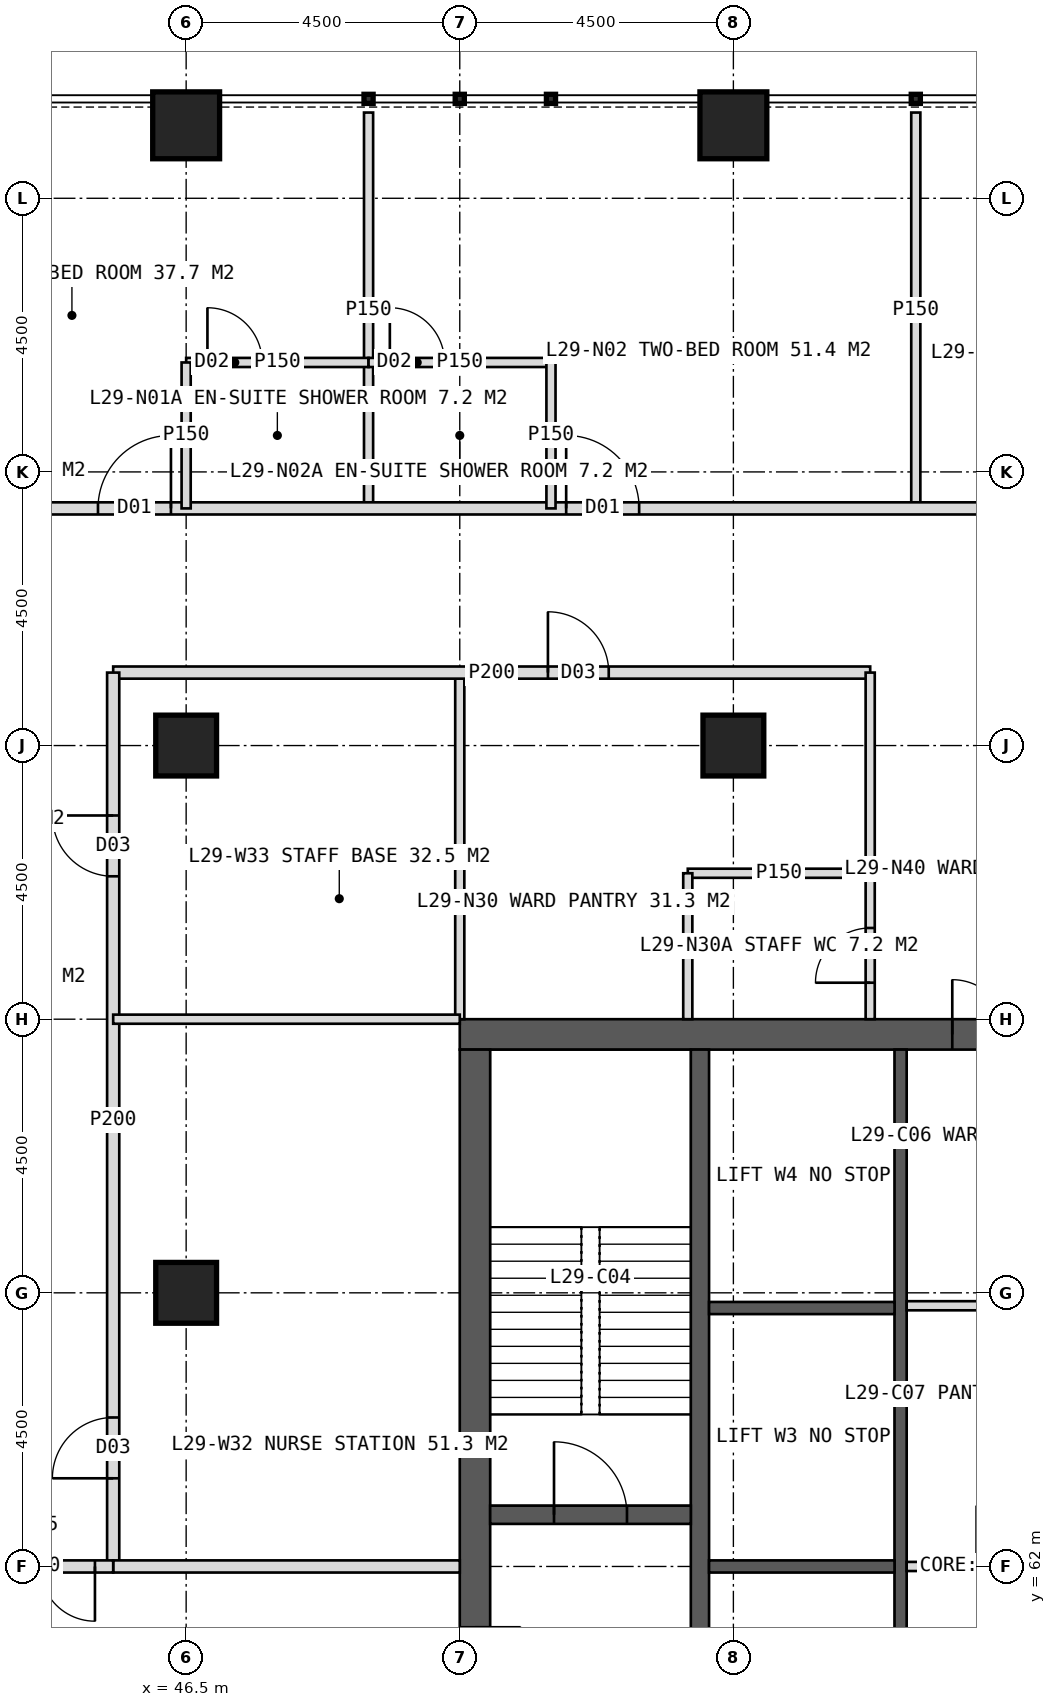
"""IFC4 building model, lengths in metres.
Left out: names, types, materials, properties, quantities, classifications, styles, units other than length and angle.
Written with IfcOpenShell. Run it as: python <this file> out.ifc"""

import sys

from ifc_helpers import new_model, si_unit, direction, frame, frame_2d, origin, origin_2d, place, context, subcontext, project, spatial, rectangle, hollow_rectangle, extrude, element, fill, save


model = new_model("IFC4")
c1 = context("Model", 3, precision=1e-05, world=origin(), true_north=direction((0.0, 1.0)))
c2 = subcontext(c1, "Body", "Model", "MODEL_VIEW")
j1 = project(units=[si_unit("LENGTHUNIT", "METRE"), si_unit("PLANEANGLEUNIT", "RADIAN")], contexts=[c1])
p1 = place(None, origin())
s1 = spatial("IfcSite", under=j1, at=p1, CompositionType="ELEMENT")
p2 = place(p1, origin())
s2 = spatial("IfcBuilding", under=s1, at=p2, CompositionType="ELEMENT")
p3 = place(p2, frame((0.0, 0.0, 124.0)))
s3 = spatial("IfcBuildingStorey", under=s2, at=p3, CompositionType="ELEMENT", Elevation=124.0)
p4 = place(p3, frame((51.0, 70.75, 0.0), z_axis=(0.0, 0.0, 1.0), x_axis=(1.0, 0.0, 0.0)))
e1 = element("IfcWall", 1, at=p4, inside=s3, PredefinedType="SHEAR", context=c2, shape_type="SweptSolid", body=[
    extrude(rectangle(XDim=18.0, YDim=0.5, at=frame_2d((9.0, 0.0))), origin(), (0.0, 0.0, 1.0), 4.0),
])
p5 = place(p4, frame((8.1, 0.0, 0.0)))
e2 = element("IfcOpeningElement", 2, at=p5, cuts=e1, PredefinedType="OPENING", context=c2, shape_type="SweptSolid", body=[
    extrude(rectangle(XDim=1.8, YDim=2.2, at=frame_2d((0.9, 1.1))), frame((0.0, 0.26, 0.0), z_axis=(0.0, -1.0, 0.0), x_axis=(1.0, 0.0, 0.0)), (0.0, 0.0, 1.0), 0.52),
])
p6 = place(p3, frame((51.25, 53.5, 0.0), z_axis=(0.0, 0.0, 1.0), x_axis=(0.0, 1.0, 0.0)))
e3 = element("IfcWall", 3, at=p6, inside=s3, PredefinedType="SHEAR", context=c2, shape_type="SweptSolid", body=[
    extrude(rectangle(XDim=17.0, YDim=0.5, at=frame_2d((8.5, 0.0))), origin(), (0.0, 0.0, 1.0), 4.0),
])
p7 = place(p6, frame((6.0, 0.0, 0.0)))
e4 = element("IfcOpeningElement", 4, at=p7, cuts=e3, PredefinedType="OPENING", context=c2, shape_type="SweptSolid", body=[
    extrude(rectangle(XDim=1.5, YDim=2.2, at=frame_2d((0.75, 1.1))), frame((0.0, 0.26, 0.0), z_axis=(0.0, -1.0, 0.0), x_axis=(1.0, 0.0, 0.0)), (0.0, 0.0, 1.0), 0.52),
])
p8 = place(p3, frame((54.95, 53.5, 0.0), z_axis=(0.0, 0.0, 1.0), x_axis=(0.0, 1.0, 0.0)))
e5 = element("IfcWall", 5, at=p8, inside=s3, PredefinedType="SHEAR", context=c2, shape_type="SweptSolid", body=[
    extrude(rectangle(XDim=17.0, YDim=0.3, at=frame_2d((8.5, 0.0))), origin(), (0.0, 0.0, 1.0), 4.0),
])
p9 = place(p3, frame((58.25, 53.5, 0.0), z_axis=(0.0, 0.0, 1.0), x_axis=(0.0, 1.0, 0.0)))
e6 = element("IfcWall", 6, at=p9, inside=s3, PredefinedType="SHEAR", context=c2, shape_type="SweptSolid", body=[
    extrude(rectangle(XDim=17.0, YDim=0.2, at=frame_2d((8.5, 0.0))), origin(), (0.0, 0.0, 1.0), 4.0),
])
p10 = place(p9, frame((1.375, 0.0, 0.0)))
e7 = element("IfcOpeningElement", 7, at=p10, cuts=e6, PredefinedType="OPENING", context=c2, shape_type="SweptSolid", body=[
    extrude(rectangle(XDim=1.4, YDim=2.2, at=frame_2d((0.7, 1.1))), frame((0.0, 0.11, 0.0), z_axis=(0.0, -1.0, 0.0), x_axis=(1.0, 0.0, 0.0)), (0.0, 0.0, 1.0), 0.22),
])
p11 = place(p9, frame((5.675, 0.0, 0.0)))
e8 = element("IfcOpeningElement", 8, at=p11, cuts=e6, PredefinedType="OPENING", context=c2, shape_type="SweptSolid", body=[
    extrude(rectangle(XDim=1.4, YDim=2.2, at=frame_2d((0.7, 1.1))), frame((0.0, 0.11, 0.0), z_axis=(0.0, -1.0, 0.0), x_axis=(1.0, 0.0, 0.0)), (0.0, 0.0, 1.0), 0.22),
])
for number, where, z_axis, x_axis in (
    (9, (55.1, 62.0, 0.0), (0.0, 0.0, 1.0), (1.0, 0.0, 0.0)),
    (10, (55.1, 66.25, 0.0), (0.0, 0.0, 1.0), (1.0, 0.0, 0.0)),
):
    element("IfcWall", number, at=place(p3, frame(where, z_axis=z_axis, x_axis=x_axis)), inside=s3, PredefinedType="SHEAR", context=c2, shape_type="SweptSolid", body=[
        extrude(rectangle(XDim=3.05, YDim=0.2, at=frame_2d((1.525, 0.0))), origin(), (0.0, 0.0, 1.0), 4.0),
    ])
p12 = place(p3, frame((51.5, 62.85, 0.0), z_axis=(0.0, 0.0, 1.0), x_axis=(1.0, 0.0, 0.0)))
e11 = element("IfcWall", 11, at=p12, inside=s3, PredefinedType="SHEAR", context=c2, shape_type="SweptSolid", body=[
    extrude(rectangle(XDim=3.3, YDim=0.3, at=frame_2d((1.65, 0.0))), origin(), (0.0, 0.0, 1.0), 4.0),
])
p13 = place(p12, frame((1.05, 0.0, 0.0)))
e12 = element("IfcOpeningElement", 12, at=p13, cuts=e11, PredefinedType="OPENING", context=c2, shape_type="SweptSolid", body=[
    extrude(rectangle(XDim=1.2, YDim=2.1, at=frame_2d((0.6, 1.05))), frame((0.0, 0.16, 0.0), z_axis=(0.0, -1.0, 0.0), x_axis=(1.0, 0.0, 0.0)), (0.0, 0.0, 1.0), 0.32),
])
for number, where, z_axis, x_axis in (
    (13, (46.5, 75.5, 0.0), (0.0, 0.0, 1.0), (1.0, 0.0, 0.0)),
    (14, (55.5, 75.5, 0.0), (0.0, 0.0, 1.0), (1.0, 0.0, 0.0)),
    (15, (46.5, 66.5, 0.0), (0.0, 0.0, 1.0), (1.0, 0.0, 0.0)),
):
    element("IfcColumn", number, at=place(p3, frame(where, z_axis=z_axis, x_axis=x_axis)), inside=s3, PredefinedType="COLUMN", context=c2, shape_type="SweptSolid", body=[
        extrude(hollow_rectangle(XDim=1.0, YDim=1.0, WallThickness=0.1, at=origin_2d()), origin(), (0.0, 0.0, 1.0), 4.0),
    ])
for number, where, z_axis, x_axis in (
    (16, (46.5, 85.7, 0.0), (0.0, 0.0, 1.0), (1.0, 0.0, 0.0)),
    (17, (55.5, 85.7, 0.0), (0.0, 0.0, 1.0), (1.0, 0.0, 0.0)),
):
    element("IfcColumn", number, at=place(p3, frame(where, z_axis=z_axis, x_axis=x_axis)), inside=s3, PredefinedType="COLUMN", context=c2, shape_type="SweptSolid", body=[
        extrude(hollow_rectangle(XDim=1.1, YDim=1.1, WallThickness=0.1, at=origin_2d()), origin(), (0.0, 0.0, 1.0), 4.0),
    ])
for number, where, z_axis, x_axis in (
    (18, (49.5, 79.4, 0.0), (0.0, 0.0, 1.0), (0.0, 1.0, 0.0)),
    (19, (58.5, 79.4, 0.0), (0.0, 0.0, 1.0), (0.0, 1.0, 0.0)),
):
    element("IfcWall", number, at=place(p3, frame(where, z_axis=z_axis, x_axis=x_axis)), inside=s3, PredefinedType="PARTITIONING", context=c2, shape_type="SweptSolid", body=[
        extrude(rectangle(XDim=6.51, YDim=0.15, at=frame_2d((3.255, 0.0))), origin(), (0.0, 0.0, 1.0), 3.75),
    ])
p14 = place(p3, frame((42.6, 79.4, 0.0), z_axis=(0.0, 0.0, 1.0), x_axis=(1.0, 0.0, 0.0)))
e20 = element("IfcWall", 20, at=p14, inside=s3, PredefinedType="PARTITIONING", context=c2, shape_type="SweptSolid", body=[
    extrude(rectangle(XDim=34.8, YDim=0.2, at=frame_2d((17.4, 0.0))), origin(), (0.0, 0.0, 1.0), 3.75),
])
p15 = place(p14, frame((2.45, 0.0, 0.0)))
e21 = element("IfcOpeningElement", 21, at=p15, cuts=e20, PredefinedType="OPENING", context=c2, shape_type="SweptSolid", body=[
    extrude(rectangle(XDim=1.2, YDim=2.2, at=frame_2d((0.6, 1.1))), frame((0.0, 0.11, 0.0), z_axis=(0.0, -1.0, 0.0), x_axis=(1.0, 0.0, 0.0)), (0.0, 0.0, 1.0), 0.22),
])
p16 = place(p14, frame((10.15, 0.0, 0.0)))
e22 = element("IfcOpeningElement", 22, at=p16, cuts=e20, PredefinedType="OPENING", context=c2, shape_type="SweptSolid", body=[
    extrude(rectangle(XDim=1.2, YDim=2.2, at=frame_2d((0.6, 1.1))), frame((0.0, 0.11, 0.0), z_axis=(0.0, -1.0, 0.0), x_axis=(1.0, 0.0, 0.0)), (0.0, 0.0, 1.0), 0.22),
])
p17 = place(p14, frame((19.8, 0.0, 0.0)))
e23 = element("IfcOpeningElement", 23, at=p17, cuts=e20, PredefinedType="OPENING", context=c2, shape_type="SweptSolid", body=[
    extrude(rectangle(XDim=1.2, YDim=2.2, at=frame_2d((0.6, 1.1))), frame((0.0, 0.11, 0.0), z_axis=(0.0, -1.0, 0.0), x_axis=(1.0, 0.0, 0.0)), (0.0, 0.0, 1.0), 0.22),
])
p18 = place(p14, frame((27.55, 0.0, 0.0)))
e24 = element("IfcOpeningElement", 24, at=p18, cuts=e20, PredefinedType="OPENING", context=c2, shape_type="SweptSolid", body=[
    extrude(rectangle(XDim=1.2, YDim=2.2, at=frame_2d((0.6, 1.1))), frame((0.0, 0.11, 0.0), z_axis=(0.0, -1.0, 0.0), x_axis=(1.0, 0.0, 0.0)), (0.0, 0.0, 1.0), 0.22),
])
p19 = place(p3, frame((46.5, 81.8, 0.0), z_axis=(0.0, 0.0, 1.0), x_axis=(1.0, 0.0, 0.0)))
e25 = element("IfcWall", 25, at=p19, inside=s3, PredefinedType="PARTITIONING", context=c2, shape_type="SweptSolid", body=[
    extrude(rectangle(XDim=3.0, YDim=0.15, at=frame_2d((1.5, 0.0))), origin(), (0.0, 0.0, 1.0), 3.75),
])
p20 = place(p19, frame((0.35, 0.0, 0.0)))
e26 = element("IfcOpeningElement", 26, at=p20, cuts=e25, PredefinedType="OPENING", context=c2, shape_type="SweptSolid", body=[
    extrude(rectangle(XDim=0.9, YDim=2.1, at=frame_2d((0.45, 1.05))), frame((0.0, 0.085, 0.0), z_axis=(0.0, -1.0, 0.0), x_axis=(1.0, 0.0, 0.0)), (0.0, 0.0, 1.0), 0.17),
])
p21 = place(p3, frame((46.5, 79.4, 0.0), z_axis=(0.0, 0.0, 1.0), x_axis=(0.0, 1.0, 0.0)))
e27 = element("IfcWall", 27, at=p21, inside=s3, PredefinedType="PARTITIONING", context=c2, shape_type="SweptSolid", body=[
    extrude(rectangle(XDim=2.4, YDim=0.15, at=frame_2d((1.2, 0.0))), origin(), (0.0, 0.0, 1.0), 2.95),
])
p22 = place(p3, frame((49.5, 81.8, 0.0), z_axis=(0.0, 0.0, 1.0), x_axis=(1.0, 0.0, 0.0)))
e28 = element("IfcWall", 28, at=p22, inside=s3, PredefinedType="PARTITIONING", context=c2, shape_type="SweptSolid", body=[
    extrude(rectangle(XDim=3.0, YDim=0.15, at=frame_2d((1.5, 0.0))), origin(), (0.0, 0.0, 1.0), 3.75),
])
p23 = place(p22, frame((0.35, 0.0, 0.0)))
e29 = element("IfcOpeningElement", 29, at=p23, cuts=e28, PredefinedType="OPENING", context=c2, shape_type="SweptSolid", body=[
    extrude(rectangle(XDim=0.9, YDim=2.1, at=frame_2d((0.45, 1.05))), frame((0.0, 0.085, 0.0), z_axis=(0.0, -1.0, 0.0), x_axis=(1.0, 0.0, 0.0)), (0.0, 0.0, 1.0), 0.17),
])
p24 = place(p3, frame((52.5, 79.4, 0.0), z_axis=(0.0, 0.0, 1.0), x_axis=(0.0, 1.0, 0.0)))
e30 = element("IfcWall", 30, at=p24, inside=s3, PredefinedType="PARTITIONING", context=c2, shape_type="SweptSolid", body=[
    extrude(rectangle(XDim=2.4, YDim=0.15, at=frame_2d((1.2, 0.0))), origin(), (0.0, 0.0, 1.0), 3.75),
])
p25 = place(p3, frame((51.0, 71.0, 0.0), z_axis=(0.0, 0.0, 1.0), x_axis=(0.0, 1.0, 0.0)))
e31 = element("IfcWall", 31, at=p25, inside=s3, PredefinedType="PARTITIONING", context=c2, shape_type="SweptSolid", body=[
    extrude(rectangle(XDim=5.7, YDim=0.15, at=frame_2d((2.85, 0.0))), origin(), (0.0, 0.0, 1.0), 3.75),
])
p26 = place(p3, frame((45.3, 76.7, 0.0), z_axis=(0.0, 0.0, 1.0), x_axis=(1.0, 0.0, 0.0)))
e32 = element("IfcWall", 32, at=p26, inside=s3, PredefinedType="PARTITIONING", context=c2, shape_type="SweptSolid", body=[
    extrude(rectangle(XDim=12.45, YDim=0.2, at=frame_2d((6.225, 0.0))), origin(), (0.0, 0.0, 1.0), 3.75),
])
p27 = place(p26, frame((7.15, 0.0, 0.0)))
e33 = element("IfcOpeningElement", 33, at=p27, cuts=e32, PredefinedType="OPENING", context=c2, shape_type="SweptSolid", body=[
    extrude(rectangle(XDim=1.0, YDim=2.1, at=frame_2d((0.5, 1.05))), frame((0.0, 0.11, 0.0), z_axis=(0.0, -1.0, 0.0), x_axis=(1.0, 0.0, 0.0)), (0.0, 0.0, 1.0), 0.22),
])
p28 = place(p3, frame((57.75, 71.0, 0.0), z_axis=(0.0, 0.0, 1.0), x_axis=(0.0, 1.0, 0.0)))
e34 = element("IfcWall", 34, at=p28, inside=s3, PredefinedType="PARTITIONING", context=c2, shape_type="SweptSolid", body=[
    extrude(rectangle(XDim=5.7, YDim=0.15, at=frame_2d((2.85, 0.0))), origin(), (0.0, 0.0, 1.0), 3.75),
])
p29 = place(p28, frame((0.6, 0.0, 0.0)))
e35 = element("IfcOpeningElement", 35, at=p29, cuts=e34, PredefinedType="OPENING", context=c2, shape_type="SweptSolid", body=[
    extrude(rectangle(XDim=0.9, YDim=2.1, at=frame_2d((0.45, 1.05))), frame((0.0, 0.085, 0.0), z_axis=(0.0, -1.0, 0.0), x_axis=(1.0, 0.0, 0.0)), (0.0, 0.0, 1.0), 0.17),
])
p30 = place(p3, frame((54.75, 73.4, 0.0), z_axis=(0.0, 0.0, 1.0), x_axis=(1.0, 0.0, 0.0)))
e36 = element("IfcWall", 36, at=p30, inside=s3, PredefinedType="PARTITIONING", context=c2, shape_type="SweptSolid", body=[
    extrude(rectangle(XDim=3.0, YDim=0.15, at=frame_2d((1.5, 0.0))), origin(), (0.0, 0.0, 1.0), 3.75),
])
p31 = place(p3, frame((54.75, 71.0, 0.0), z_axis=(0.0, 0.0, 1.0), x_axis=(0.0, 1.0, 0.0)))
e37 = element("IfcWall", 37, at=p31, inside=s3, PredefinedType="PARTITIONING", context=c2, shape_type="SweptSolid", body=[
    extrude(rectangle(XDim=2.4, YDim=0.15, at=frame_2d((1.2, 0.0))), origin(), (0.0, 0.0, 1.0), 3.75),
])
p32 = place(p3, frame((45.3, 62.0, 0.0), z_axis=(0.0, 0.0, 1.0), x_axis=(0.0, 1.0, 0.0)))
e38 = element("IfcWall", 38, at=p32, inside=s3, PredefinedType="PARTITIONING", context=c2, shape_type="SweptSolid", body=[
    extrude(rectangle(XDim=14.7, YDim=0.2, at=frame_2d((7.35, 0.0))), origin(), (0.0, 0.0, 1.0), 3.75),
])
p33 = place(p32, frame((1.45, 0.0, 0.0)))
e39 = element("IfcOpeningElement", 39, at=p33, cuts=e38, PredefinedType="OPENING", context=c2, shape_type="SweptSolid", body=[
    extrude(rectangle(XDim=1.0, YDim=2.1, at=frame_2d((0.5, 1.05))), frame((0.0, 0.11, 0.0), z_axis=(0.0, -1.0, 0.0), x_axis=(1.0, 0.0, 0.0)), (0.0, 0.0, 1.0), 0.22),
])
p34 = place(p32, frame((11.35, 0.0, 0.0)))
e40 = element("IfcOpeningElement", 40, at=p34, cuts=e38, PredefinedType="OPENING", context=c2, shape_type="SweptSolid", body=[
    extrude(rectangle(XDim=1.0, YDim=2.1, at=frame_2d((0.5, 1.05))), frame((0.0, 0.11, 0.0), z_axis=(0.0, -1.0, 0.0), x_axis=(1.0, 0.0, 0.0)), (0.0, 0.0, 1.0), 0.22),
])
p35 = place(p3, frame((51.0, 62.0, 0.0), z_axis=(0.0, 0.0, 1.0), x_axis=(-1.0, 0.0, 0.0)))
e41 = element("IfcWall", 41, at=p35, inside=s3, PredefinedType="SOLIDWALL", context=c2, shape_type="SweptSolid", body=[
    extrude(rectangle(XDim=5.7, YDim=0.2, at=frame_2d((2.85, 0.0))), origin(), (0.0, 0.0, 1.0), 2.95),
])
p36 = place(p3, frame((51.0, 71.0, 0.0), z_axis=(0.0, 0.0, 1.0), x_axis=(-1.0, 0.0, 0.0)))
e42 = element("IfcWall", 42, at=p36, inside=s3, PredefinedType="PARTITIONING", context=c2, shape_type="SweptSolid", body=[
    extrude(rectangle(XDim=5.7, YDim=0.15, at=frame_2d((2.85, 0.0))), origin(), (0.0, 0.0, 1.0), 3.75),
])
p37 = place(p3, frame((45.3, 62.0, 0.0), z_axis=(0.0, 0.0, 1.0), x_axis=(-1.0, 0.0, 0.0)))
e43 = element("IfcWall", 43, at=p37, inside=s3, PredefinedType="SOLIDWALL", context=c2, shape_type="SweptSolid", body=[
    extrude(rectangle(XDim=2.7, YDim=0.2, at=frame_2d((1.35, 0.0))), origin(), (0.0, 0.0, 1.0), 2.95),
])
p38 = place(p37, frame((0.3, 0.0, 0.0)))
e44 = element("IfcOpeningElement", 44, at=p38, cuts=e43, PredefinedType="OPENING", context=c2, shape_type="SweptSolid", body=[
    extrude(rectangle(XDim=1.8, YDim=2.2, at=frame_2d((0.9, 1.1))), frame((0.0, 0.11, 0.0), z_axis=(0.0, -1.0, 0.0), x_axis=(1.0, 0.0, 0.0)), (0.0, 0.0, 1.0), 0.22),
])
p39 = place(p3, frame((58.35, 62.0, 0.0), z_axis=(0.0, 0.0, 1.0), x_axis=(1.0, 0.0, 0.0)))
e45 = element("IfcWall", 45, at=p39, inside=s3, PredefinedType="PARTITIONING", context=c2, shape_type="SweptSolid", body=[
    extrude(rectangle(XDim=3.3, YDim=0.15, at=frame_2d((1.65, 0.0))), origin(), (0.0, 0.0, 1.0), 3.75),
])
p40 = place(p39, frame((1.15, 0.0, 0.0)))
e46 = element("IfcOpeningElement", 46, at=p40, cuts=e45, PredefinedType="OPENING", context=c2, shape_type="SweptSolid", body=[
    extrude(rectangle(XDim=1.0, YDim=2.1, at=frame_2d((0.5, 1.05))), frame((0.0, 0.085, 0.0), z_axis=(0.0, -1.0, 0.0), x_axis=(1.0, 0.0, 0.0)), (0.0, 0.0, 1.0), 0.17),
])
p41 = place(p3, frame((58.35, 66.288, 0.0), z_axis=(0.0, 0.0, 1.0), x_axis=(1.0, 0.0, 0.0)))
e47 = element("IfcWall", 47, at=p41, inside=s3, PredefinedType="PARTITIONING", context=c2, shape_type="SweptSolid", body=[
    extrude(rectangle(XDim=3.3, YDim=0.15, at=frame_2d((1.65, 0.0))), origin(), (0.0, 0.0, 1.0), 3.75),
])
p42 = place(p15, origin())
e48 = element("IfcDoor", 48, at=p42, inside=s3, OperationType="SINGLE_SWING_RIGHT", PredefinedType="DOOR", context=c2, shape_type="SweptSolid", body=[
    extrude(rectangle(XDim=1.2, YDim=2.2, at=frame_2d((0.6, 1.1))), frame((0.0, 0.025, 0.0), z_axis=(0.0, -1.0, 0.0), x_axis=(1.0, 0.0, 0.0)), (0.0, 0.0, 1.0), 0.05),
])
fill(e21, e48)
p43 = place(p20, origin())
e49 = element("IfcDoor", 49, at=p43, inside=s3, OperationType="SINGLE_SWING_LEFT", PredefinedType="DOOR", context=c2, shape_type="SweptSolid", body=[
    extrude(rectangle(XDim=0.9, YDim=2.1, at=frame_2d((0.45, 1.05))), frame((0.0, 0.025, 0.0), z_axis=(0.0, -1.0, 0.0), x_axis=(1.0, 0.0, 0.0)), (0.0, 0.0, 1.0), 0.05),
])
fill(e26, e49)
p44 = place(p16, origin())
e50 = element("IfcDoor", 50, at=p44, inside=s3, OperationType="SINGLE_SWING_LEFT", PredefinedType="DOOR", context=c2, shape_type="SweptSolid", body=[
    extrude(rectangle(XDim=1.2, YDim=2.2, at=frame_2d((0.6, 1.1))), frame((0.0, 0.025, 0.0), z_axis=(0.0, -1.0, 0.0), x_axis=(1.0, 0.0, 0.0)), (0.0, 0.0, 1.0), 0.05),
])
fill(e22, e50)
p45 = place(p23, origin())
e51 = element("IfcDoor", 51, at=p45, inside=s3, OperationType="SINGLE_SWING_LEFT", PredefinedType="DOOR", context=c2, shape_type="SweptSolid", body=[
    extrude(rectangle(XDim=0.9, YDim=2.1, at=frame_2d((0.45, 1.05))), frame((0.0, 0.025, 0.0), z_axis=(0.0, -1.0, 0.0), x_axis=(1.0, 0.0, 0.0)), (0.0, 0.0, 1.0), 0.05),
])
fill(e29, e51)
p46 = place(p29, origin())
e52 = element("IfcDoor", 52, at=p46, inside=s3, OperationType="SINGLE_SWING_LEFT", PredefinedType="DOOR", context=c2, shape_type="SweptSolid", body=[
    extrude(rectangle(XDim=0.9, YDim=2.1, at=frame_2d((0.45, 1.05))), frame((0.0, 0.025, 0.0), z_axis=(0.0, -1.0, 0.0), x_axis=(1.0, 0.0, 0.0)), (0.0, 0.0, 1.0), 0.05),
])
fill(e35, e52)
p47 = place(p27, origin())
e53 = element("IfcDoor", 53, at=p47, inside=s3, OperationType="SINGLE_SWING_LEFT", PredefinedType="DOOR", context=c2, shape_type="SweptSolid", body=[
    extrude(rectangle(XDim=1.0, YDim=2.1, at=frame_2d((0.5, 1.05))), frame((0.0, 0.025, 0.0), z_axis=(0.0, -1.0, 0.0), x_axis=(1.0, 0.0, 0.0)), (0.0, 0.0, 1.0), 0.05),
])
fill(e33, e53)
p48 = place(p33, origin())
e54 = element("IfcDoor", 54, at=p48, inside=s3, OperationType="SINGLE_SWING_LEFT", PredefinedType="DOOR", context=c2, shape_type="SweptSolid", body=[
    extrude(rectangle(XDim=1.0, YDim=2.1, at=frame_2d((0.5, 1.05))), frame((0.0, 0.025, 0.0), z_axis=(0.0, -1.0, 0.0), x_axis=(1.0, 0.0, 0.0)), (0.0, 0.0, 1.0), 0.05),
])
fill(e39, e54)
p49 = place(p34, origin())
e55 = element("IfcDoor", 55, at=p49, inside=s3, OperationType="SINGLE_SWING_RIGHT", PredefinedType="DOOR", context=c2, shape_type="SweptSolid", body=[
    extrude(rectangle(XDim=1.0, YDim=2.1, at=frame_2d((0.5, 1.05))), frame((0.0, 0.025, 0.0), z_axis=(0.0, -1.0, 0.0), x_axis=(1.0, 0.0, 0.0)), (0.0, 0.0, 1.0), 0.05),
])
fill(e40, e55)
p50 = place(p38, origin())
e56 = element("IfcDoor", 56, at=p50, inside=s3, OperationType="DOUBLE_DOOR_DOUBLE_SWING", PredefinedType="DOOR", context=c2, shape_type="SweptSolid", body=[
    extrude(rectangle(XDim=1.8, YDim=2.2, at=frame_2d((0.9, 1.1))), frame((0.0, 0.025, 0.0), z_axis=(0.0, -1.0, 0.0), x_axis=(1.0, 0.0, 0.0)), (0.0, 0.0, 1.0), 0.05),
])
fill(e44, e56)
p51 = place(p13, origin())
e57 = element("IfcDoor", 57, at=p51, inside=s3, OperationType="SINGLE_SWING_LEFT", PredefinedType="DOOR", context=c2, shape_type="SweptSolid", body=[
    extrude(rectangle(XDim=1.2, YDim=2.1, at=frame_2d((0.6, 1.05))), frame((0.0, 0.025, 0.0), z_axis=(0.0, -1.0, 0.0), x_axis=(1.0, 0.0, 0.0)), (0.0, 0.0, 1.0), 0.05),
])
fill(e12, e57)
p52 = place(p5, origin())
e58 = element("IfcDoor", 58, at=p52, inside=s3, OperationType="DOUBLE_DOOR_SINGLE_SWING", PredefinedType="DOOR", context=c2, shape_type="SweptSolid", body=[
    extrude(rectangle(XDim=1.8, YDim=2.2, at=frame_2d((0.9, 1.1))), frame((0.0, 0.025, 0.0), z_axis=(0.0, -1.0, 0.0), x_axis=(1.0, 0.0, 0.0)), (0.0, 0.0, 1.0), 0.05),
])
fill(e2, e58)
save(model, sys.argv[1])
